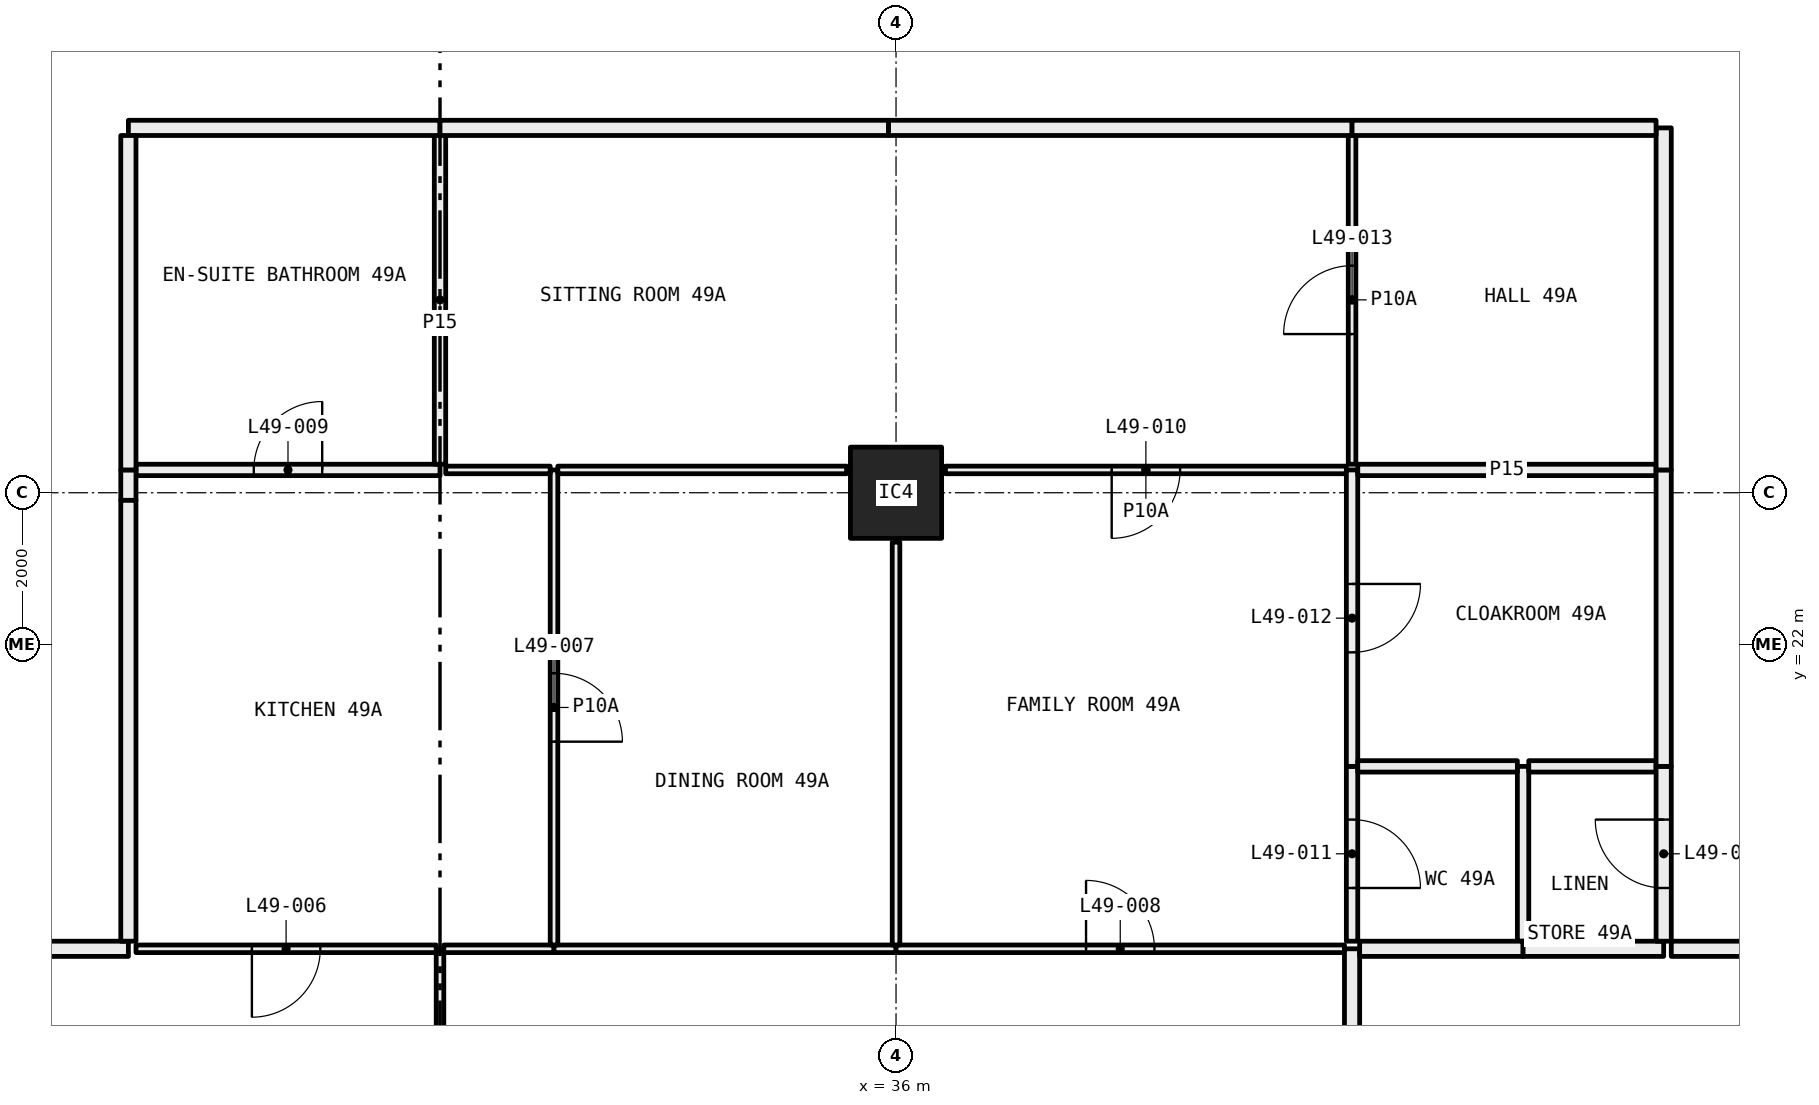
"""IFC4 building model, lengths in metres.
Left out: names, types, materials, properties, quantities, classifications, styles, units other than length and angle.
Written with IfcOpenShell. Run it as: python <this file> out.ifc"""

import sys

from ifc_helpers import new_model, si_unit, direction, frame, frame_2d, origin, origin_2d, place, context, subcontext, project, spatial, rectangle, hollow_rectangle, extrude, element, fill, save


model = new_model("IFC4")
c1 = context("Model", 3, precision=1e-05, world=origin(), true_north=direction((0.0, 1.0)))
c2 = subcontext(c1, "Body", "Model", "MODEL_VIEW")
j1 = project(units=[si_unit("LENGTHUNIT", "METRE"), si_unit("PLANEANGLEUNIT", "RADIAN")], contexts=[c1])
p1 = place(None, origin())
s1 = spatial("IfcSite", under=j1, at=p1, CompositionType="ELEMENT")
p2 = place(p1, origin())
s2 = spatial("IfcBuilding", under=s1, at=p2, CompositionType="ELEMENT")
p3 = place(p2, frame((0.0, 0.0, 185.85)))
s3 = spatial("IfcBuildingStorey", under=s2, at=p3, CompositionType="ELEMENT", Elevation=185.85)
p4 = place(p3, frame((36.0, 24.0, 0.0), z_axis=(0.0, 0.0, 1.0), x_axis=(1.0, 0.0, 0.0)))
e1 = element("IfcColumn", 1, at=p4, inside=s3, PredefinedType="COLUMN", context=c2, shape_type="SweptSolid", body=[
    extrude(hollow_rectangle(XDim=1.2, YDim=1.2, WallThickness=0.05, at=origin_2d()), origin(), (0.0, 0.0, 1.0), 3.05),
])
p5 = place(p3, frame((30.0, 12.72, 0.0), z_axis=(0.0, 0.0, 1.0), x_axis=(0.0, 1.0, 0.0)))
e2 = element("IfcWall", 2, at=p5, inside=s3, PredefinedType="PARTITIONING", context=c2, shape_type="SweptSolid", body=[
    extrude(rectangle(XDim=5.28, YDim=0.1, at=frame_2d((2.64, 0.0))), origin(), (0.0, 0.0, 1.0), 3.05),
])
p6 = place(p5, frame((2.19, 0.0, 0.0)))
e3 = element("IfcOpeningElement", 3, at=p6, cuts=e2, PredefinedType="OPENING", context=c2, shape_type="SweptSolid", body=[
    extrude(rectangle(XDim=0.9, YDim=2.1, at=frame_2d((0.45, 1.05))), frame((0.0, 0.06, 0.0), z_axis=(0.0, -1.0, 0.0), x_axis=(1.0, 0.0, 0.0)), (0.0, 0.0, 1.0), 0.12),
])
p7 = place(p3, frame((29.95, 18.0, 0.0), z_axis=(0.0, 0.0, 1.0), x_axis=(-1.0, 0.0, 0.0)))
e4 = element("IfcWall", 4, at=p7, inside=s3, PredefinedType="PARTITIONING", context=c2, shape_type="SweptSolid", body=[
    extrude(rectangle(XDim=3.95, YDim=0.1, at=frame_2d((1.975, 0.0))), origin(), (0.0, 0.0, 1.0), 3.05),
])
p8 = place(p7, frame((1.525, 0.0, 0.0)))
e5 = element("IfcOpeningElement", 5, at=p8, cuts=e4, PredefinedType="OPENING", context=c2, shape_type="SweptSolid", body=[
    extrude(rectangle(XDim=0.9, YDim=2.1, at=frame_2d((0.45, 1.05))), frame((0.0, 0.06, 0.0), z_axis=(0.0, -1.0, 0.0), x_axis=(1.0, 0.0, 0.0)), (0.0, 0.0, 1.0), 0.12),
])
p9 = place(p3, frame((25.9, 18.0, 0.0), z_axis=(0.0, 0.0, 1.0), x_axis=(-1.0, 0.0, 0.0)))
e6 = element("IfcWall", 6, at=p9, inside=s3, PredefinedType="PARTITIONING", context=c2, shape_type="SweptSolid", body=[
    extrude(rectangle(XDim=1.9, YDim=0.2, at=frame_2d((0.95, 0.0))), origin(), (0.0, 0.0, 1.0), 3.05),
])
p10 = place(p3, frame((31.5, 18.0, 0.0), z_axis=(0.0, 0.0, 1.0), x_axis=(-1.0, 0.0, 0.0)))
e7 = element("IfcWall", 7, at=p10, inside=s3, PredefinedType="PARTITIONING", context=c2, shape_type="SweptSolid", body=[
    extrude(rectangle(XDim=1.45, YDim=0.1, at=frame_2d((0.725, 0.0))), origin(), (0.0, 0.0, 1.0), 3.05),
])
p11 = place(p3, frame((36.0, 18.0, 0.0), z_axis=(0.0, 0.0, 1.0), x_axis=(-1.0, 0.0, 0.0)))
e8 = element("IfcWall", 8, at=p11, inside=s3, PredefinedType="PARTITIONING", context=c2, shape_type="SweptSolid", body=[
    extrude(rectangle(XDim=4.5, YDim=0.1, at=frame_2d((2.25, 0.0))), origin(), (0.0, 0.0, 1.0), 2.45),
])
p12 = place(p3, frame((41.9, 18.0, 0.0), z_axis=(0.0, 0.0, 1.0), x_axis=(-1.0, 0.0, 0.0)))
e9 = element("IfcWall", 9, at=p12, inside=s3, PredefinedType="PARTITIONING", context=c2, shape_type="SweptSolid", body=[
    extrude(rectangle(XDim=5.9, YDim=0.1, at=frame_2d((2.95, 0.0))), origin(), (0.0, 0.0, 1.0), 2.45),
])
p13 = place(p12, frame((2.5, 0.0, 0.0)))
e10 = element("IfcOpeningElement", 10, at=p13, cuts=e9, PredefinedType="OPENING", context=c2, shape_type="SweptSolid", body=[
    extrude(rectangle(XDim=0.9, YDim=2.1, at=frame_2d((0.45, 1.05))), frame((0.0, 0.06, 0.0), z_axis=(0.0, -1.0, 0.0), x_axis=(1.0, 0.0, 0.0)), (0.0, 0.0, 1.0), 0.12),
])
p14 = place(p3, frame((42.0, 12.72, 0.0), z_axis=(0.0, 0.0, 1.0), x_axis=(0.0, 1.0, 0.0)))
e11 = element("IfcWall", 11, at=p14, inside=s3, PredefinedType="PARTITIONING", context=c2, shape_type="SweptSolid", body=[
    extrude(rectangle(XDim=5.28, YDim=0.2, at=frame_2d((2.64, 0.0))), origin(), (0.0, 0.0, 1.0), 3.05),
])
p15 = place(p3, frame((31.5, 18.05, 0.0), z_axis=(0.0, 0.0, 1.0), x_axis=(0.0, 1.0, 0.0)))
e12 = element("IfcWall", 12, at=p15, inside=s3, PredefinedType="PARTITIONING", context=c2, shape_type="SweptSolid", body=[
    extrude(rectangle(XDim=6.25, YDim=0.1, at=frame_2d((3.125, 0.0))), origin(), (0.0, 0.0, 1.0), 2.45),
])
p16 = place(p15, frame((2.675, 0.0, 0.0)))
e13 = element("IfcOpeningElement", 13, at=p16, cuts=e12, PredefinedType="OPENING", context=c2, shape_type="SweptSolid", body=[
    extrude(rectangle(XDim=0.9, YDim=2.1, at=frame_2d((0.45, 1.05))), frame((0.0, 0.06, 0.0), z_axis=(0.0, -1.0, 0.0), x_axis=(1.0, 0.0, 0.0)), (0.0, 0.0, 1.0), 0.12),
])
p17 = place(p3, frame((30.0, 24.3, 0.0), z_axis=(0.0, 0.0, 1.0), x_axis=(-1.0, 0.0, 0.0)))
e14 = element("IfcWall", 14, at=p17, inside=s3, PredefinedType="PARTITIONING", context=c2, shape_type="SweptSolid", body=[
    extrude(rectangle(XDim=4.0, YDim=0.15, at=frame_2d((2.0, 0.0))), origin(), (0.0, 0.0, 1.0), 3.05),
])
p18 = place(p17, frame((1.55, 0.0, 0.0)))
e15 = element("IfcOpeningElement", 15, at=p18, cuts=e14, PredefinedType="OPENING", context=c2, shape_type="SweptSolid", body=[
    extrude(rectangle(XDim=0.9, YDim=2.1, at=frame_2d((0.45, 1.05))), frame((0.0, 0.085, 0.0), z_axis=(0.0, -1.0, 0.0), x_axis=(1.0, 0.0, 0.0)), (0.0, 0.0, 1.0), 0.17),
])
p19 = place(p3, frame((31.45, 24.3, 0.0), z_axis=(0.0, 0.0, 1.0), x_axis=(-1.0, 0.0, 0.0)))
e16 = element("IfcWall", 16, at=p19, inside=s3, PredefinedType="PARTITIONING", context=c2, shape_type="SweptSolid", body=[
    extrude(rectangle(XDim=1.375, YDim=0.1, at=frame_2d((0.688, 0.0))), origin(), (0.0, 0.0, 1.0), 3.05),
])
p20 = place(p3, frame((25.9, 24.3, 0.0), z_axis=(0.0, 0.0, 1.0), x_axis=(0.0, -1.0, 0.0)))
e17 = element("IfcWall", 17, at=p20, inside=s3, PredefinedType="PARTITIONING", context=c2, shape_type="SweptSolid", body=[
    extrude(rectangle(XDim=0.4, YDim=0.2, at=frame_2d((0.2, 0.0))), origin(), (0.0, 0.0, 1.0), 2.45),
])
p21 = place(p3, frame((25.9, 23.9, 0.0), z_axis=(0.0, 0.0, 1.0), x_axis=(0.0, -1.0, 0.0)))
e18 = element("IfcWall", 18, at=p21, inside=s3, PredefinedType="PARTITIONING", context=c2, shape_type="SweptSolid", body=[
    extrude(rectangle(XDim=5.8, YDim=0.2, at=frame_2d((2.9, 0.0))), origin(), (0.0, 0.0, 1.0), 3.05),
])
p22 = place(p3, frame((36.0, 18.05, 0.0), z_axis=(0.0, 0.0, 1.0), x_axis=(0.0, 1.0, 0.0)))
e19 = element("IfcWall", 19, at=p22, inside=s3, PredefinedType="PARTITIONING", context=c2, shape_type="SweptSolid", body=[
    extrude(rectangle(XDim=5.3, YDim=0.1, at=frame_2d((2.65, 0.0))), origin(), (0.0, 0.0, 1.0), 2.45),
])
p23 = place(p3, frame((35.35, 24.3, 0.0), z_axis=(0.0, 0.0, 1.0), x_axis=(-1.0, 0.0, 0.0)))
e20 = element("IfcWall", 20, at=p23, inside=s3, PredefinedType="PARTITIONING", context=c2, shape_type="SweptSolid", body=[
    extrude(rectangle(XDim=3.8, YDim=0.1, at=frame_2d((1.9, 0.0))), origin(), (0.0, 0.0, 1.0), 3.05),
])
p24 = place(p3, frame((41.925, 24.3, 0.0), z_axis=(0.0, 0.0, 1.0), x_axis=(-1.0, 0.0, 0.0)))
e21 = element("IfcWall", 21, at=p24, inside=s3, PredefinedType="PARTITIONING", context=c2, shape_type="SweptSolid", body=[
    extrude(rectangle(XDim=5.275, YDim=0.1, at=frame_2d((2.638, 0.0))), origin(), (0.0, 0.0, 1.0), 3.05),
])
p25 = place(p24, frame((2.188, 0.0, 0.0)))
e22 = element("IfcOpeningElement", 22, at=p25, cuts=e21, PredefinedType="OPENING", context=c2, shape_type="SweptSolid", body=[
    extrude(rectangle(XDim=0.9, YDim=2.1, at=frame_2d((0.45, 1.05))), frame((0.0, 0.06, 0.0), z_axis=(0.0, -1.0, 0.0), x_axis=(1.0, 0.0, 0.0)), (0.0, 0.0, 1.0), 0.12),
])
p26 = place(p3, frame((42.0, 18.1, 0.0), z_axis=(0.0, 0.0, 1.0), x_axis=(0.0, 1.0, 0.0)))
e23 = element("IfcWall", 23, at=p26, inside=s3, PredefinedType="PARTITIONING", context=c2, shape_type="SweptSolid", body=[
    extrude(rectangle(XDim=2.3, YDim=0.15, at=frame_2d((1.15, 0.0))), origin(), (0.0, 0.0, 1.0), 3.05),
])
p27 = place(p26, frame((0.7, 0.0, 0.0)))
e24 = element("IfcOpeningElement", 24, at=p27, cuts=e23, PredefinedType="OPENING", context=c2, shape_type="SweptSolid", body=[
    extrude(rectangle(XDim=0.9, YDim=2.1, at=frame_2d((0.45, 1.05))), frame((0.0, 0.085, 0.0), z_axis=(0.0, -1.0, 0.0), x_axis=(1.0, 0.0, 0.0)), (0.0, 0.0, 1.0), 0.17),
])
p28 = place(p3, frame((42.0, 20.4, 0.0), z_axis=(0.0, 0.0, 1.0), x_axis=(0.0, 1.0, 0.0)))
e25 = element("IfcWall", 25, at=p28, inside=s3, PredefinedType="PARTITIONING", context=c2, shape_type="SweptSolid", body=[
    extrude(rectangle(XDim=3.9, YDim=0.15, at=frame_2d((1.95, 0.0))), origin(), (0.0, 0.0, 1.0), 2.45),
])
p29 = place(p28, frame((1.5, 0.0, 0.0)))
e26 = element("IfcOpeningElement", 26, at=p29, cuts=e25, PredefinedType="OPENING", context=c2, shape_type="SweptSolid", body=[
    extrude(rectangle(XDim=0.9, YDim=2.1, at=frame_2d((0.45, 1.05))), frame((0.0, 0.085, 0.0), z_axis=(0.0, -1.0, 0.0), x_axis=(1.0, 0.0, 0.0)), (0.0, 0.0, 1.0), 0.17),
])
p30 = place(p3, frame((30.0, 24.375, 0.0), z_axis=(0.0, 0.0, 1.0), x_axis=(0.0, 1.0, 0.0)))
e27 = element("IfcWall", 27, at=p30, inside=s3, PredefinedType="PARTITIONING", context=c2, shape_type="SweptSolid", body=[
    extrude(rectangle(XDim=4.325, YDim=0.15, at=frame_2d((2.163, 0.0))), origin(), (0.0, 0.0, 1.0), 3.05),
])
p31 = place(p3, frame((30.0, 28.8, 0.0), z_axis=(0.0, 0.0, 1.0), x_axis=(-1.0, 0.0, 0.0)))
e28 = element("IfcWall", 28, at=p31, inside=s3, PredefinedType="PARTITIONING", context=c2, shape_type="SweptSolid", body=[
    extrude(rectangle(XDim=4.1, YDim=0.2, at=frame_2d((2.05, 0.0))), origin(), (0.0, 0.0, 1.0), 3.05),
])
p32 = place(p3, frame((25.9, 28.7, 0.0), z_axis=(0.0, 0.0, 1.0), x_axis=(0.0, -1.0, 0.0)))
e29 = element("IfcWall", 29, at=p32, inside=s3, PredefinedType="PARTITIONING", context=c2, shape_type="SweptSolid", body=[
    extrude(rectangle(XDim=4.4, YDim=0.2, at=frame_2d((2.2, 0.0))), origin(), (0.0, 0.0, 1.0), 3.05),
])
p33 = place(p3, frame((42.0, 24.375, 0.0), z_axis=(0.0, 0.0, 1.0), x_axis=(0.0, 1.0, 0.0)))
e30 = element("IfcWall", 30, at=p33, inside=s3, PredefinedType="PARTITIONING", context=c2, shape_type="SweptSolid", body=[
    extrude(rectangle(XDim=4.325, YDim=0.1, at=frame_2d((2.163, 0.0))), origin(), (0.0, 0.0, 1.0), 3.05),
])
p34 = place(p33, frame((1.712, 0.0, 0.0)))
e31 = element("IfcOpeningElement", 31, at=p34, cuts=e30, PredefinedType="OPENING", context=c2, shape_type="SweptSolid", body=[
    extrude(rectangle(XDim=0.9, YDim=2.1, at=frame_2d((0.45, 1.05))), frame((0.0, 0.06, 0.0), z_axis=(0.0, -1.0, 0.0), x_axis=(1.0, 0.0, 0.0)), (0.0, 0.0, 1.0), 0.12),
])
p35 = place(p3, frame((42.0, 28.8, 0.0), z_axis=(0.0, 0.0, 1.0), x_axis=(-1.0, 0.0, 0.0)))
e32 = element("IfcWall", 32, at=p35, inside=s3, PredefinedType="PARTITIONING", context=c2, shape_type="SweptSolid", body=[
    extrude(rectangle(XDim=6.1, YDim=0.2, at=frame_2d((3.05, 0.0))), origin(), (0.0, 0.0, 1.0), 2.45),
])
p36 = place(p3, frame((35.9, 28.8, 0.0), z_axis=(0.0, 0.0, 1.0), x_axis=(-1.0, 0.0, 0.0)))
e33 = element("IfcWall", 33, at=p36, inside=s3, PredefinedType="PARTITIONING", context=c2, shape_type="SweptSolid", body=[
    extrude(rectangle(XDim=5.9, YDim=0.2, at=frame_2d((2.95, 0.0))), origin(), (0.0, 0.0, 1.0), 3.05),
])
p37 = place(p3, frame((44.25, 18.1, 0.0), z_axis=(0.0, 0.0, 1.0), x_axis=(0.0, 1.0, 0.0)))
e34 = element("IfcWall", 34, at=p37, inside=s3, PredefinedType="PARTITIONING", context=c2, shape_type="SweptSolid", body=[
    extrude(rectangle(XDim=2.3, YDim=0.15, at=frame_2d((1.15, 0.0))), origin(), (0.0, 0.0, 1.0), 3.05),
])
p38 = place(p3, frame((44.175, 20.4, 0.0), z_axis=(0.0, 0.0, 1.0), x_axis=(-1.0, 0.0, 0.0)))
e35 = element("IfcWall", 35, at=p38, inside=s3, PredefinedType="PARTITIONING", context=c2, shape_type="SweptSolid", body=[
    extrude(rectangle(XDim=2.1, YDim=0.15, at=frame_2d((1.05, 0.0))), origin(), (0.0, 0.0, 1.0), 3.05),
])
p39 = place(p3, frame((42.1, 18.0, 0.0), z_axis=(0.0, 0.0, 1.0), x_axis=(1.0, 0.0, 0.0)))
e36 = element("IfcWall", 36, at=p39, inside=s3, PredefinedType="PARTITIONING", context=c2, shape_type="SweptSolid", body=[
    extrude(rectangle(XDim=2.15, YDim=0.2, at=frame_2d((1.075, 0.0))), origin(), (0.0, 0.0, 1.0), 3.05),
])
p40 = place(p3, frame((46.0, 20.4, 0.0), z_axis=(0.0, 0.0, 1.0), x_axis=(-1.0, 0.0, 0.0)))
e37 = element("IfcWall", 37, at=p40, inside=s3, PredefinedType="PARTITIONING", context=c2, shape_type="SweptSolid", body=[
    extrude(rectangle(XDim=1.675, YDim=0.15, at=frame_2d((0.837, 0.0))), origin(), (0.0, 0.0, 1.0), 3.05),
])
p41 = place(p3, frame((44.25, 18.0, 0.0), z_axis=(0.0, 0.0, 1.0), x_axis=(1.0, 0.0, 0.0)))
e38 = element("IfcWall", 38, at=p41, inside=s3, PredefinedType="PARTITIONING", context=c2, shape_type="SweptSolid", body=[
    extrude(rectangle(XDim=1.85, YDim=0.2, at=frame_2d((0.925, 0.0))), origin(), (0.0, 0.0, 1.0), 3.05),
])
p42 = place(p3, frame((46.1, 18.1, 0.0), z_axis=(0.0, 0.0, 1.0), x_axis=(0.0, 1.0, 0.0)))
e39 = element("IfcWall", 39, at=p42, inside=s3, PredefinedType="PARTITIONING", context=c2, shape_type="SweptSolid", body=[
    extrude(rectangle(XDim=2.3, YDim=0.2, at=frame_2d((1.15, 0.0))), origin(), (0.0, 0.0, 1.0), 3.05),
])
p43 = place(p42, frame((0.7, 0.0, 0.0)))
e40 = element("IfcOpeningElement", 40, at=p43, cuts=e39, PredefinedType="OPENING", context=c2, shape_type="SweptSolid", body=[
    extrude(rectangle(XDim=0.9, YDim=2.1, at=frame_2d((0.45, 1.05))), frame((0.0, 0.11, 0.0), z_axis=(0.0, -1.0, 0.0), x_axis=(1.0, 0.0, 0.0)), (0.0, 0.0, 1.0), 0.22),
])
p44 = place(p3, frame((46.0, 24.3, 0.0), z_axis=(0.0, 0.0, 1.0), x_axis=(-1.0, 0.0, 0.0)))
e41 = element("IfcWall", 41, at=p44, inside=s3, PredefinedType="PARTITIONING", context=c2, shape_type="SweptSolid", body=[
    extrude(rectangle(XDim=3.925, YDim=0.15, at=frame_2d((1.962, 0.0))), origin(), (0.0, 0.0, 1.0), 3.05),
])
p45 = place(p3, frame((46.1, 20.4, 0.0), z_axis=(0.0, 0.0, 1.0), x_axis=(0.0, 1.0, 0.0)))
e42 = element("IfcWall", 42, at=p45, inside=s3, PredefinedType="PARTITIONING", context=c2, shape_type="SweptSolid", body=[
    extrude(rectangle(XDim=3.9, YDim=0.2, at=frame_2d((1.95, 0.0))), origin(), (0.0, 0.0, 1.0), 2.45),
])
p46 = place(p3, frame((46.1, 24.3, 0.0), z_axis=(0.0, 0.0, 1.0), x_axis=(0.0, 1.0, 0.0)))
e43 = element("IfcWall", 43, at=p46, inside=s3, PredefinedType="PARTITIONING", context=c2, shape_type="SweptSolid", body=[
    extrude(rectangle(XDim=4.5, YDim=0.2, at=frame_2d((2.25, 0.0))), origin(), (0.0, 0.0, 1.0), 3.05),
])
p47 = place(p3, frame((46.0, 28.8, 0.0), z_axis=(0.0, 0.0, 1.0), x_axis=(-1.0, 0.0, 0.0)))
e44 = element("IfcWall", 44, at=p47, inside=s3, PredefinedType="PARTITIONING", context=c2, shape_type="SweptSolid", body=[
    extrude(rectangle(XDim=4.0, YDim=0.2, at=frame_2d((2.0, 0.0))), origin(), (0.0, 0.0, 1.0), 3.05),
])
p48 = place(p3, frame((53.28, 18.0, 0.0), z_axis=(0.0, 0.0, 1.0), x_axis=(-1.0, 0.0, 0.0)))
e45 = element("IfcWall", 45, at=p48, inside=s3, PredefinedType="PARTITIONING", context=c2, shape_type="SweptSolid", body=[
    extrude(rectangle(XDim=7.08, YDim=0.2, at=frame_2d((3.54, 0.0))), origin(), (0.0, 0.0, 1.0), 3.05),
])
p49 = place(p48, frame((3.09, 0.0, 0.0)))
e46 = element("IfcOpeningElement", 46, at=p49, cuts=e45, PredefinedType="OPENING", context=c2, shape_type="SweptSolid", body=[
    extrude(rectangle(XDim=0.9, YDim=2.1, at=frame_2d((0.45, 1.05))), frame((0.0, 0.11, 0.0), z_axis=(0.0, -1.0, 0.0), x_axis=(1.0, 0.0, 0.0)), (0.0, 0.0, 1.0), 0.22),
])
p50 = place(p8, origin())
e47 = element("IfcDoor", 47, at=p50, inside=s3, OperationType="SINGLE_SWING_LEFT", PredefinedType="DOOR", context=c2, shape_type="SweptSolid", body=[
    extrude(rectangle(XDim=0.9, YDim=2.1, at=frame_2d((0.45, 1.05))), frame((0.0, 0.025, 0.0), z_axis=(0.0, -1.0, 0.0), x_axis=(1.0, 0.0, 0.0)), (0.0, 0.0, 1.0), 0.05),
])
fill(e5, e47)
p51 = place(p16, frame((0.9, 0.0, 0.0), x_axis=(-1.0, 0.0, 0.0)))
e48 = element("IfcDoor", 48, at=p51, inside=s3, OperationType="SINGLE_SWING_LEFT", PredefinedType="DOOR", context=c2, shape_type="SweptSolid", body=[
    extrude(rectangle(XDim=0.9, YDim=2.1, at=frame_2d((0.45, 1.05))), frame((0.0, 0.025, 0.0), z_axis=(0.0, -1.0, 0.0), x_axis=(1.0, 0.0, 0.0)), (0.0, 0.0, 1.0), 0.05),
])
fill(e13, e48)
p52 = place(p13, frame((0.9, 0.0, 0.0), x_axis=(-1.0, 0.0, 0.0)))
e49 = element("IfcDoor", 49, at=p52, inside=s3, OperationType="SINGLE_SWING_RIGHT", PredefinedType="DOOR", context=c2, shape_type="SweptSolid", body=[
    extrude(rectangle(XDim=0.9, YDim=2.1, at=frame_2d((0.45, 1.05))), frame((0.0, 0.025, 0.0), z_axis=(0.0, -1.0, 0.0), x_axis=(1.0, 0.0, 0.0)), (0.0, 0.0, 1.0), 0.05),
])
fill(e10, e49)
p53 = place(p18, frame((0.9, 0.0, 0.0), x_axis=(-1.0, 0.0, 0.0)))
e50 = element("IfcDoor", 50, at=p53, inside=s3, OperationType="SINGLE_SWING_LEFT", PredefinedType="DOOR", context=c2, shape_type="SweptSolid", body=[
    extrude(rectangle(XDim=0.9, YDim=2.1, at=frame_2d((0.45, 1.05))), frame((0.0, 0.025, 0.0), z_axis=(0.0, -1.0, 0.0), x_axis=(1.0, 0.0, 0.0)), (0.0, 0.0, 1.0), 0.05),
])
fill(e15, e50)
p54 = place(p25, origin())
e51 = element("IfcDoor", 51, at=p54, inside=s3, OperationType="SINGLE_SWING_LEFT", PredefinedType="DOOR", context=c2, shape_type="SweptSolid", body=[
    extrude(rectangle(XDim=0.9, YDim=2.1, at=frame_2d((0.45, 1.05))), frame((0.0, 0.025, 0.0), z_axis=(0.0, -1.0, 0.0), x_axis=(1.0, 0.0, 0.0)), (0.0, 0.0, 1.0), 0.05),
])
fill(e22, e51)
p55 = place(p27, frame((0.9, 0.0, 0.0), x_axis=(-1.0, 0.0, 0.0)))
e52 = element("IfcDoor", 52, at=p55, inside=s3, OperationType="SINGLE_SWING_LEFT", PredefinedType="DOOR", context=c2, shape_type="SweptSolid", body=[
    extrude(rectangle(XDim=0.9, YDim=2.1, at=frame_2d((0.45, 1.05))), frame((0.0, 0.025, 0.0), z_axis=(0.0, -1.0, 0.0), x_axis=(1.0, 0.0, 0.0)), (0.0, 0.0, 1.0), 0.05),
])
fill(e24, e52)
p56 = place(p29, frame((0.9, 0.0, 0.0), x_axis=(-1.0, 0.0, 0.0)))
e53 = element("IfcDoor", 53, at=p56, inside=s3, OperationType="SINGLE_SWING_RIGHT", PredefinedType="DOOR", context=c2, shape_type="SweptSolid", body=[
    extrude(rectangle(XDim=0.9, YDim=2.1, at=frame_2d((0.45, 1.05))), frame((0.0, 0.025, 0.0), z_axis=(0.0, -1.0, 0.0), x_axis=(1.0, 0.0, 0.0)), (0.0, 0.0, 1.0), 0.05),
])
fill(e26, e53)
p57 = place(p34, origin())
e54 = element("IfcDoor", 54, at=p57, inside=s3, OperationType="SINGLE_SWING_RIGHT", PredefinedType="DOOR", context=c2, shape_type="SweptSolid", body=[
    extrude(rectangle(XDim=0.9, YDim=2.1, at=frame_2d((0.45, 1.05))), frame((0.0, 0.025, 0.0), z_axis=(0.0, -1.0, 0.0), x_axis=(1.0, 0.0, 0.0)), (0.0, 0.0, 1.0), 0.05),
])
fill(e31, e54)
p58 = place(p43, origin())
e55 = element("IfcDoor", 55, at=p58, inside=s3, OperationType="SINGLE_SWING_LEFT", PredefinedType="DOOR", context=c2, shape_type="SweptSolid", body=[
    extrude(rectangle(XDim=0.9, YDim=2.1, at=frame_2d((0.45, 1.05))), frame((0.0, 0.025, 0.0), z_axis=(0.0, -1.0, 0.0), x_axis=(1.0, 0.0, 0.0)), (0.0, 0.0, 1.0), 0.05),
])
fill(e40, e55)
save(model, sys.argv[1])
